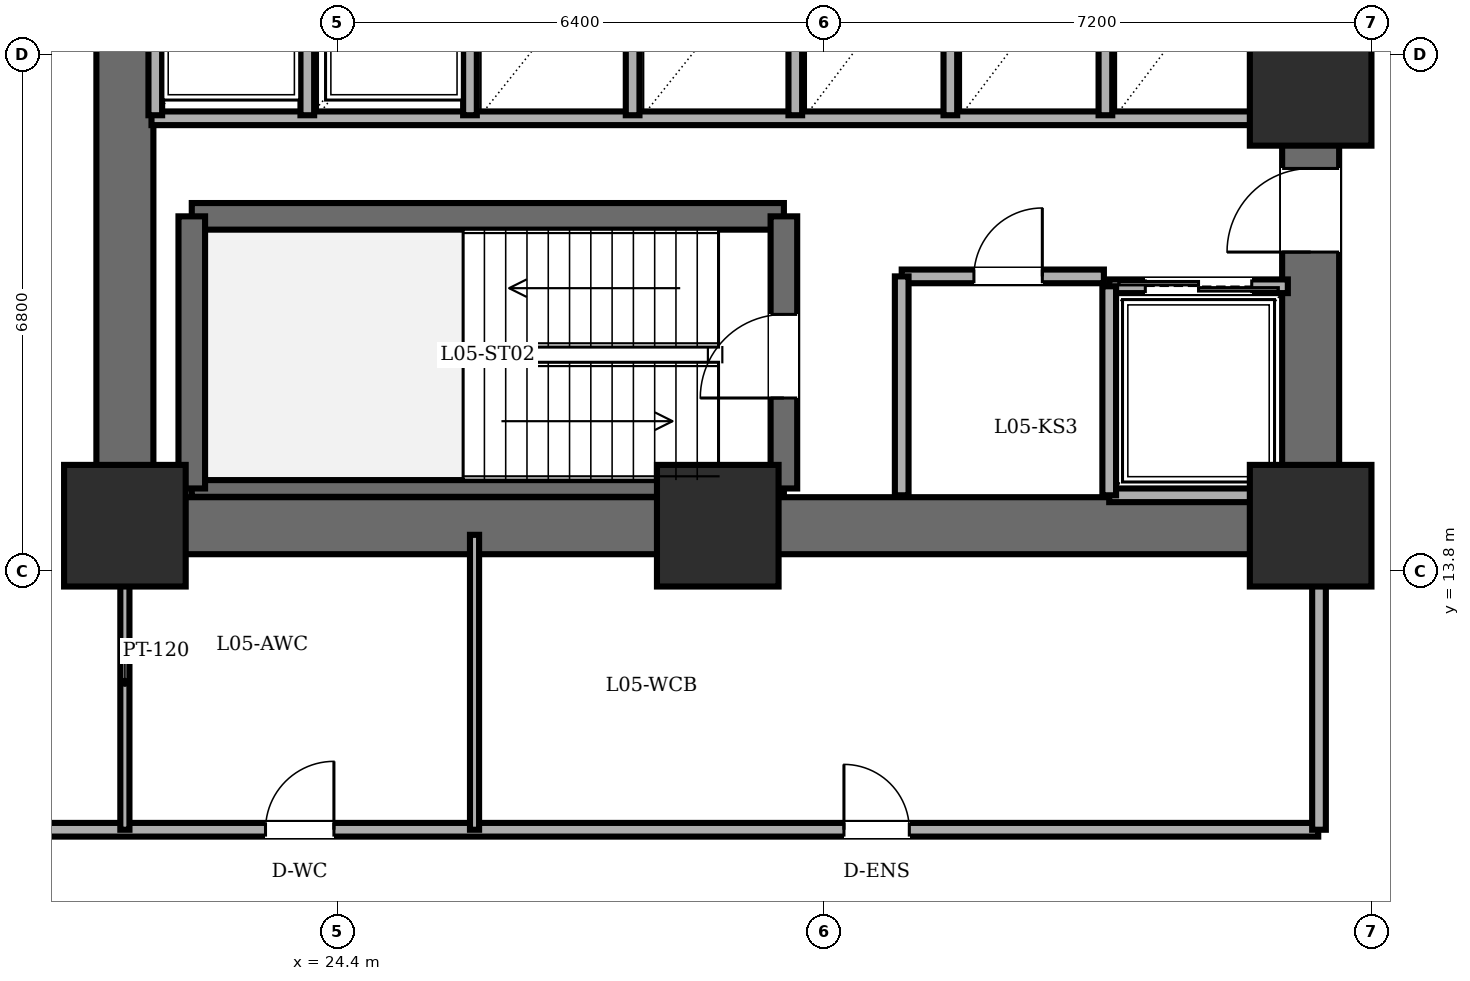
"""IFC4 building model, lengths in metres.
Left out: names, types, materials, properties, quantities, classifications, styles, units other than length and angle.
Written with IfcOpenShell. Run it as: python <this file> out.ifc"""

import sys

from ifc_helpers import new_model, si_unit, direction, frame, frame_2d, origin, origin_2d, place, context, subcontext, project, spatial, rectangle, extrude, element, fill, save


model = new_model("IFC4")
c1 = context("Model", 3, precision=1e-05, world=origin(), true_north=direction((0.0, 1.0)))
c2 = subcontext(c1, "Body", "Model", "MODEL_VIEW")
j1 = project(units=[si_unit("LENGTHUNIT", "METRE"), si_unit("PLANEANGLEUNIT", "RADIAN")], contexts=[c1])
p1 = place(None, origin())
s1 = spatial("IfcSite", under=j1, at=p1, CompositionType="ELEMENT")
p2 = place(p1, origin())
s2 = spatial("IfcBuilding", under=s1, at=p2, CompositionType="ELEMENT")
p3 = place(p2, frame((0.0, 0.0, 19.35)))
s3 = spatial("IfcBuildingStorey", under=s2, at=p3, CompositionType="ELEMENT", Elevation=19.35)
for number, where, z_axis, x_axis in (
    (1, (21.6, 14.4, 0.0), (0.0, 0.0, 1.0), (1.0, 0.0, 0.0)),
    (2, (29.4, 14.4, 0.0), (0.0, 0.0, 1.0), (1.0, 0.0, 0.0)),
    (3, (37.2, 14.4, 0.0), (0.0, 0.0, 1.0), (1.0, 0.0, 0.0)),
    (4, (37.2, 20.2, 0.0), (0.0, 0.0, 1.0), (1.0, 0.0, 0.0)),
):
    element("IfcColumn", number, at=place(p3, frame(where, z_axis=z_axis, x_axis=x_axis)), inside=s3, PredefinedType="COLUMN", context=c2, shape_type="SweptSolid", body=[
        extrude(rectangle(XDim=1.6, YDim=1.6, at=origin_2d()), origin(), (0.0, 0.0, 1.0), 4.65),
    ])
p4 = place(p3, frame((21.6, 14.4, 0.0), z_axis=(0.0, 0.0, 1.0), x_axis=(0.0, 1.0, 0.0)))
e5 = element("IfcWall", 5, at=p4, inside=s3, PredefinedType="SHEAR", context=c2, shape_type="SweptSolid", body=[
    extrude(rectangle(XDim=19.2, YDim=0.75, at=frame_2d((9.6, 0.0))), origin(), (0.0, 0.0, 1.0), 4.41),
])
p5 = place(p3, frame((37.2, 14.4, 0.0), z_axis=(0.0, 0.0, 1.0), x_axis=(-1.0, 0.0, 0.0)))
e6 = element("IfcWall", 6, at=p5, inside=s3, PredefinedType="SHEAR", context=c2, shape_type="SweptSolid", body=[
    extrude(rectangle(XDim=15.6, YDim=0.75, at=frame_2d((7.8, 0.0))), origin(), (0.0, 0.0, 1.0), 4.41),
])
p6 = place(p3, frame((37.2, 14.4, 0.0), z_axis=(0.0, 0.0, 1.0), x_axis=(0.0, 1.0, 0.0)))
e7 = element("IfcWall", 7, at=p6, inside=s3, PredefinedType="SHEAR", context=c2, shape_type="SweptSolid", body=[
    extrude(rectangle(XDim=19.2, YDim=0.75, at=frame_2d((9.6, 0.0))), origin(), (0.0, 0.0, 1.0), 4.41),
])
p7 = place(p6, frame((15.8, 0.0, 0.0)))
e8 = element("IfcOpeningElement", 8, at=p7, cuts=e7, PredefinedType="OPENING", context=c2, shape_type="SweptSolid", body=[
    extrude(rectangle(XDim=1.15, YDim=2.15, at=frame_2d((0.575, 1.075))), frame((0.0, 0.385, 0.0), z_axis=(0.0, -1.0, 0.0), x_axis=(1.0, 0.0, 0.0)), (0.0, 0.0, 1.0), 0.77),
])
p8 = place(p6, frame((3.6, 0.0, 0.0)))
e9 = element("IfcOpeningElement", 9, at=p8, cuts=e7, PredefinedType="OPENING", context=c2, shape_type="SweptSolid", body=[
    extrude(rectangle(XDim=1.1, YDim=2.15, at=frame_2d((0.55, 1.075))), frame((0.0, 0.385, 0.0), z_axis=(0.0, -1.0, 0.0), x_axis=(1.0, 0.0, 0.0)), (0.0, 0.0, 1.0), 0.77),
])
p9 = place(p6, frame((8.6, 0.0, 0.0)))
e10 = element("IfcOpeningElement", 10, at=p9, cuts=e7, PredefinedType="OPENING", context=c2, shape_type="SweptSolid", body=[
    extrude(rectangle(XDim=1.3, YDim=2.2, at=frame_2d((0.65, 1.1))), frame((0.0, 0.385, 0.0), z_axis=(0.0, -1.0, 0.0), x_axis=(1.0, 0.0, 0.0)), (0.0, 0.0, 1.0), 0.77),
])
p10 = place(p3, frame((22.48, 18.47, 0.0), z_axis=(0.0, 0.0, 1.0), x_axis=(1.0, 0.0, 0.0)))
e11 = element("IfcWall", 11, at=p10, inside=s3, PredefinedType="SOLIDWALL", context=c2, shape_type="SweptSolid", body=[
    extrude(rectangle(XDim=7.79, YDim=0.35, at=frame_2d((3.895, 0.0))), origin(), (0.0, 0.0, 1.0), 4.41),
])
p11 = place(p3, frame((22.48, 14.89, 0.0), z_axis=(0.0, 0.0, 1.0), x_axis=(1.0, 0.0, 0.0)))
e12 = element("IfcWall", 12, at=p11, inside=s3, PredefinedType="PARTITIONING", context=c2, shape_type="SweptSolid", body=[
    extrude(rectangle(XDim=7.79, YDim=0.22, at=frame_2d((3.895, 0.0))), origin(), (0.0, 0.0, 1.0), 4.41),
])
p12 = place(p3, frame((22.48, 14.89, 0.0), z_axis=(0.0, 0.0, 1.0), x_axis=(0.0, 1.0, 0.0)))
e13 = element("IfcWall", 13, at=p12, inside=s3, PredefinedType="SOLIDWALL", context=c2, shape_type="SweptSolid", body=[
    extrude(rectangle(XDim=3.58, YDim=0.35, at=frame_2d((1.79, 0.0))), origin(), (0.0, 0.0, 1.0), 4.41),
])
p13 = place(p3, frame((30.27, 14.89, 0.0), z_axis=(0.0, 0.0, 1.0), x_axis=(0.0, 1.0, 0.0)))
e14 = element("IfcWall", 14, at=p13, inside=s3, PredefinedType="SOLIDWALL", context=c2, shape_type="SweptSolid", body=[
    extrude(rectangle(XDim=3.58, YDim=0.35, at=frame_2d((1.79, 0.0))), origin(), (0.0, 0.0, 1.0), 4.41),
])
p14 = place(p13, frame((1.19, 0.0, 0.0)))
e15 = element("IfcOpeningElement", 15, at=p14, cuts=e14, PredefinedType="OPENING", context=c2, shape_type="SweptSolid", body=[
    extrude(rectangle(XDim=1.1, YDim=2.15, at=frame_2d((0.55, 1.075))), frame((0.0, 0.185, 0.0), z_axis=(0.0, -1.0, 0.0), x_axis=(1.0, 0.0, 0.0)), (0.0, 0.0, 1.0), 0.37),
])
p15 = place(p3, frame((21.95, 19.76, 0.0), z_axis=(0.0, 0.0, 1.0), x_axis=(1.0, 0.0, 0.0)))
e16 = element("IfcWall", 16, at=p15, inside=s3, PredefinedType="PARTITIONING", context=c2, shape_type="SweptSolid", body=[
    extrude(rectangle(XDim=14.87, YDim=0.18, at=frame_2d((7.435, 0.0))), origin(), (0.0, 0.0, 1.0), 4.41),
])
p16 = place(p3, frame((31.82, 17.68, 0.0), z_axis=(0.0, 0.0, 1.0), x_axis=(1.0, 0.0, 0.0)))
e17 = element("IfcWall", 17, at=p16, inside=s3, PredefinedType="PARTITIONING", context=c2, shape_type="SweptSolid", body=[
    extrude(rectangle(XDim=2.66, YDim=0.18, at=frame_2d((1.33, 0.0))), origin(), (0.0, 0.0, 1.0), 4.41),
])
p17 = place(p16, frame((0.95, 0.0, 0.0)))
e18 = element("IfcOpeningElement", 18, at=p17, cuts=e17, PredefinedType="OPENING", context=c2, shape_type="SweptSolid", body=[
    extrude(rectangle(XDim=0.9, YDim=2.05, at=frame_2d((0.45, 1.025))), frame((0.0, 0.1, 0.0), z_axis=(0.0, -1.0, 0.0), x_axis=(1.0, 0.0, 0.0)), (0.0, 0.0, 1.0), 0.2),
])
p18 = place(p3, frame((31.82, 14.8, 0.0), z_axis=(0.0, 0.0, 1.0), x_axis=(0.0, 1.0, 0.0)))
e19 = element("IfcWall", 19, at=p18, inside=s3, PredefinedType="PARTITIONING", context=c2, shape_type="SweptSolid", body=[
    extrude(rectangle(XDim=2.88, YDim=0.18, at=frame_2d((1.44, 0.0))), origin(), (0.0, 0.0, 1.0), 4.41),
])
p19 = place(p3, frame((34.55, 17.55, 0.0), z_axis=(0.0, 0.0, 1.0), x_axis=(1.0, 0.0, 0.0)))
e20 = element("IfcWall", 20, at=p19, inside=s3, PredefinedType="PARTITIONING", context=c2, shape_type="SweptSolid", body=[
    extrude(rectangle(XDim=2.35, YDim=0.18, at=frame_2d((1.175, 0.0))), origin(), (0.0, 0.0, 1.0), 4.41),
])
p20 = place(p19, frame((0.475, 0.0, 0.0)))
e21 = element("IfcOpeningElement", 21, at=p20, cuts=e20, PredefinedType="OPENING", context=c2, shape_type="SweptSolid", body=[
    extrude(rectangle(XDim=1.4, YDim=2.3, at=frame_2d((0.7, 1.15))), frame((0.0, 0.1, 0.0), z_axis=(0.0, -1.0, 0.0), x_axis=(1.0, 0.0, 0.0)), (0.0, 0.0, 1.0), 0.2),
])
p21 = place(p3, frame((36.9, 14.8, 0.0), z_axis=(0.0, 0.0, 1.0), x_axis=(-1.0, 0.0, 0.0)))
e22 = element("IfcWall", 22, at=p21, inside=s3, PredefinedType="PARTITIONING", context=c2, shape_type="SweptSolid", body=[
    extrude(rectangle(XDim=2.35, YDim=0.18, at=frame_2d((1.175, 0.0))), origin(), (0.0, 0.0, 1.0), 4.41),
])
p22 = place(p3, frame((34.55, 17.55, 0.0), z_axis=(0.0, 0.0, 1.0), x_axis=(0.0, -1.0, 0.0)))
e23 = element("IfcWall", 23, at=p22, inside=s3, PredefinedType="PARTITIONING", context=c2, shape_type="SweptSolid", body=[
    extrude(rectangle(XDim=2.75, YDim=0.18, at=frame_2d((1.375, 0.0))), origin(), (0.0, 0.0, 1.0), 4.41),
])
for number, where, z_axis, x_axis in (
    (24, (24.0, 19.8, 0.0), (0.0, 0.0, 1.0), (0.0, 1.0, 0.0)),
    (25, (22.0, 22.3, 0.0), (0.0, 0.0, 1.0), (0.0, -1.0, 0.0)),
    (26, (26.14, 19.8, 0.0), (0.0, 0.0, 1.0), (0.0, 1.0, 0.0)),
    (27, (28.28, 19.8, 0.0), (0.0, 0.0, 1.0), (0.0, 1.0, 0.0)),
    (28, (30.42, 19.8, 0.0), (0.0, 0.0, 1.0), (0.0, 1.0, 0.0)),
    (29, (32.46, 19.8, 0.0), (0.0, 0.0, 1.0), (0.0, 1.0, 0.0)),
    (30, (34.5, 19.8, 0.0), (0.0, 0.0, 1.0), (0.0, 1.0, 0.0)),
    (31, (36.54, 19.8, 0.0), (0.0, 0.0, 1.0), (0.0, 1.0, 0.0)),
):
    element("IfcWall", number, at=place(p3, frame(where, z_axis=z_axis, x_axis=x_axis)), inside=s3, PredefinedType="PARTITIONING", context=c2, shape_type="SweptSolid", body=[
        extrude(rectangle(XDim=2.5, YDim=0.18, at=frame_2d((1.25, 0.0))), origin(), (0.0, 0.0, 1.0), 4.41),
    ])
p23 = place(p3, frame((17.85, 10.4, 0.0), z_axis=(0.0, 0.0, 1.0), x_axis=(1.0, 0.0, 0.0)))
e32 = element("IfcWall", 32, at=p23, inside=s3, PredefinedType="PARTITIONING", context=c2, shape_type="SweptSolid", body=[
    extrude(rectangle(XDim=19.45, YDim=0.18, at=frame_2d((9.725, 0.0))), origin(), (0.0, 0.0, 1.0), 4.41),
])
p24 = place(p23, frame((1.575, 0.0, 0.0)))
e33 = element("IfcOpeningElement", 33, at=p24, cuts=e32, PredefinedType="OPENING", context=c2, shape_type="SweptSolid", body=[
    extrude(rectangle(XDim=0.92, YDim=2.1, at=frame_2d((0.46, 1.05))), frame((0.0, 0.1, 0.0), z_axis=(0.0, -1.0, 0.0), x_axis=(1.0, 0.0, 0.0)), (0.0, 0.0, 1.0), 0.2),
])
p25 = place(p23, frame((5.6, 0.0, 0.0)))
e34 = element("IfcOpeningElement", 34, at=p25, cuts=e32, PredefinedType="OPENING", context=c2, shape_type="SweptSolid", body=[
    extrude(rectangle(XDim=0.9, YDim=2.1, at=frame_2d((0.45, 1.05))), frame((0.0, 0.1, 0.0), z_axis=(0.0, -1.0, 0.0), x_axis=(1.0, 0.0, 0.0)), (0.0, 0.0, 1.0), 0.2),
])
p26 = place(p23, frame((13.21, 0.0, 0.0)))
e35 = element("IfcOpeningElement", 35, at=p26, cuts=e32, PredefinedType="OPENING", context=c2, shape_type="SweptSolid", body=[
    extrude(rectangle(XDim=0.86, YDim=2.1, at=frame_2d((0.43, 1.05))), frame((0.0, 0.1, 0.0), z_axis=(0.0, -1.0, 0.0), x_axis=(1.0, 0.0, 0.0)), (0.0, 0.0, 1.0), 0.2),
])
p27 = place(p3, frame((21.6, 10.4, 0.0), z_axis=(0.0, 0.0, 1.0), x_axis=(0.0, 1.0, 0.0)))
e36 = element("IfcWall", 36, at=p27, inside=s3, PredefinedType="PARTITIONING", context=c2, shape_type="SweptSolid", body=[
    extrude(rectangle(XDim=3.88, YDim=0.12, at=frame_2d((1.94, 0.0))), origin(), (0.0, 0.0, 1.0), 3.592),
])
p28 = place(p3, frame((26.2, 10.4, 0.0), z_axis=(0.0, 0.0, 1.0), x_axis=(0.0, 1.0, 0.0)))
e37 = element("IfcWall", 37, at=p28, inside=s3, PredefinedType="PARTITIONING", context=c2, shape_type="SweptSolid", body=[
    extrude(rectangle(XDim=3.88, YDim=0.12, at=frame_2d((1.94, 0.0))), origin(), (0.0, 0.0, 1.0), 4.41),
])
p29 = place(p3, frame((37.31, 10.4, 0.0), z_axis=(0.0, 0.0, 1.0), x_axis=(0.0, 1.0, 0.0)))
e38 = element("IfcWall", 38, at=p29, inside=s3, PredefinedType="PARTITIONING", context=c2, shape_type="SweptSolid", body=[
    extrude(rectangle(XDim=3.88, YDim=0.18, at=frame_2d((1.94, 0.0))), origin(), (0.0, 0.0, 1.0), 3.592),
])
p30 = place(p14, origin())
e39 = element("IfcDoor", 39, at=p30, inside=s3, OperationType="SINGLE_SWING_LEFT", PredefinedType="DOOR", context=c2, shape_type="SweptSolid", body=[
    extrude(rectangle(XDim=1.1, YDim=2.15, at=frame_2d((0.55, 1.075))), frame((0.0, 0.025, 0.0), z_axis=(0.0, -1.0, 0.0), x_axis=(1.0, 0.0, 0.0)), (0.0, 0.0, 1.0), 0.05),
])
fill(e15, e39)
p31 = place(p8, origin())
e40 = element("IfcDoor", 40, at=p31, inside=s3, OperationType="SINGLE_SWING_LEFT", PredefinedType="DOOR", context=c2, shape_type="SweptSolid", body=[
    extrude(rectangle(XDim=1.1, YDim=2.15, at=frame_2d((0.55, 1.075))), frame((0.0, 0.025, 0.0), z_axis=(0.0, -1.0, 0.0), x_axis=(1.0, 0.0, 0.0)), (0.0, 0.0, 1.0), 0.05),
])
fill(e9, e40)
p32 = place(p17, origin())
e41 = element("IfcDoor", 41, at=p32, inside=s3, OperationType="SINGLE_SWING_RIGHT", PredefinedType="DOOR", context=c2, shape_type="SweptSolid", body=[
    extrude(rectangle(XDim=0.9, YDim=2.05, at=frame_2d((0.45, 1.025))), frame((0.0, 0.025, 0.0), z_axis=(0.0, -1.0, 0.0), x_axis=(1.0, 0.0, 0.0)), (0.0, 0.0, 1.0), 0.05),
])
fill(e18, e41)
p33 = place(p20, origin())
e42 = element("IfcDoor", 42, at=p33, inside=s3, OperationType="DOUBLE_DOOR_SLIDING", PredefinedType="DOOR", context=c2, shape_type="SweptSolid", body=[
    extrude(rectangle(XDim=1.4, YDim=2.3, at=frame_2d((0.7, 1.15))), frame((0.0, 0.025, 0.0), z_axis=(0.0, -1.0, 0.0), x_axis=(1.0, 0.0, 0.0)), (0.0, 0.0, 1.0), 0.05),
])
fill(e21, e42)
p34 = place(p25, origin())
e43 = element("IfcDoor", 43, at=p34, inside=s3, OperationType="SINGLE_SWING_RIGHT", PredefinedType="DOOR", context=c2, shape_type="SweptSolid", body=[
    extrude(rectangle(XDim=0.9, YDim=2.1, at=frame_2d((0.45, 1.05))), frame((0.0, 0.025, 0.0), z_axis=(0.0, -1.0, 0.0), x_axis=(1.0, 0.0, 0.0)), (0.0, 0.0, 1.0), 0.05),
])
fill(e34, e43)
p35 = place(p26, origin())
e44 = element("IfcDoor", 44, at=p35, inside=s3, OperationType="SINGLE_SWING_LEFT", PredefinedType="DOOR", context=c2, shape_type="SweptSolid", body=[
    extrude(rectangle(XDim=0.86, YDim=2.1, at=frame_2d((0.43, 1.05))), frame((0.0, 0.025, 0.0), z_axis=(0.0, -1.0, 0.0), x_axis=(1.0, 0.0, 0.0)), (0.0, 0.0, 1.0), 0.05),
])
fill(e35, e44)
save(model, sys.argv[1])
